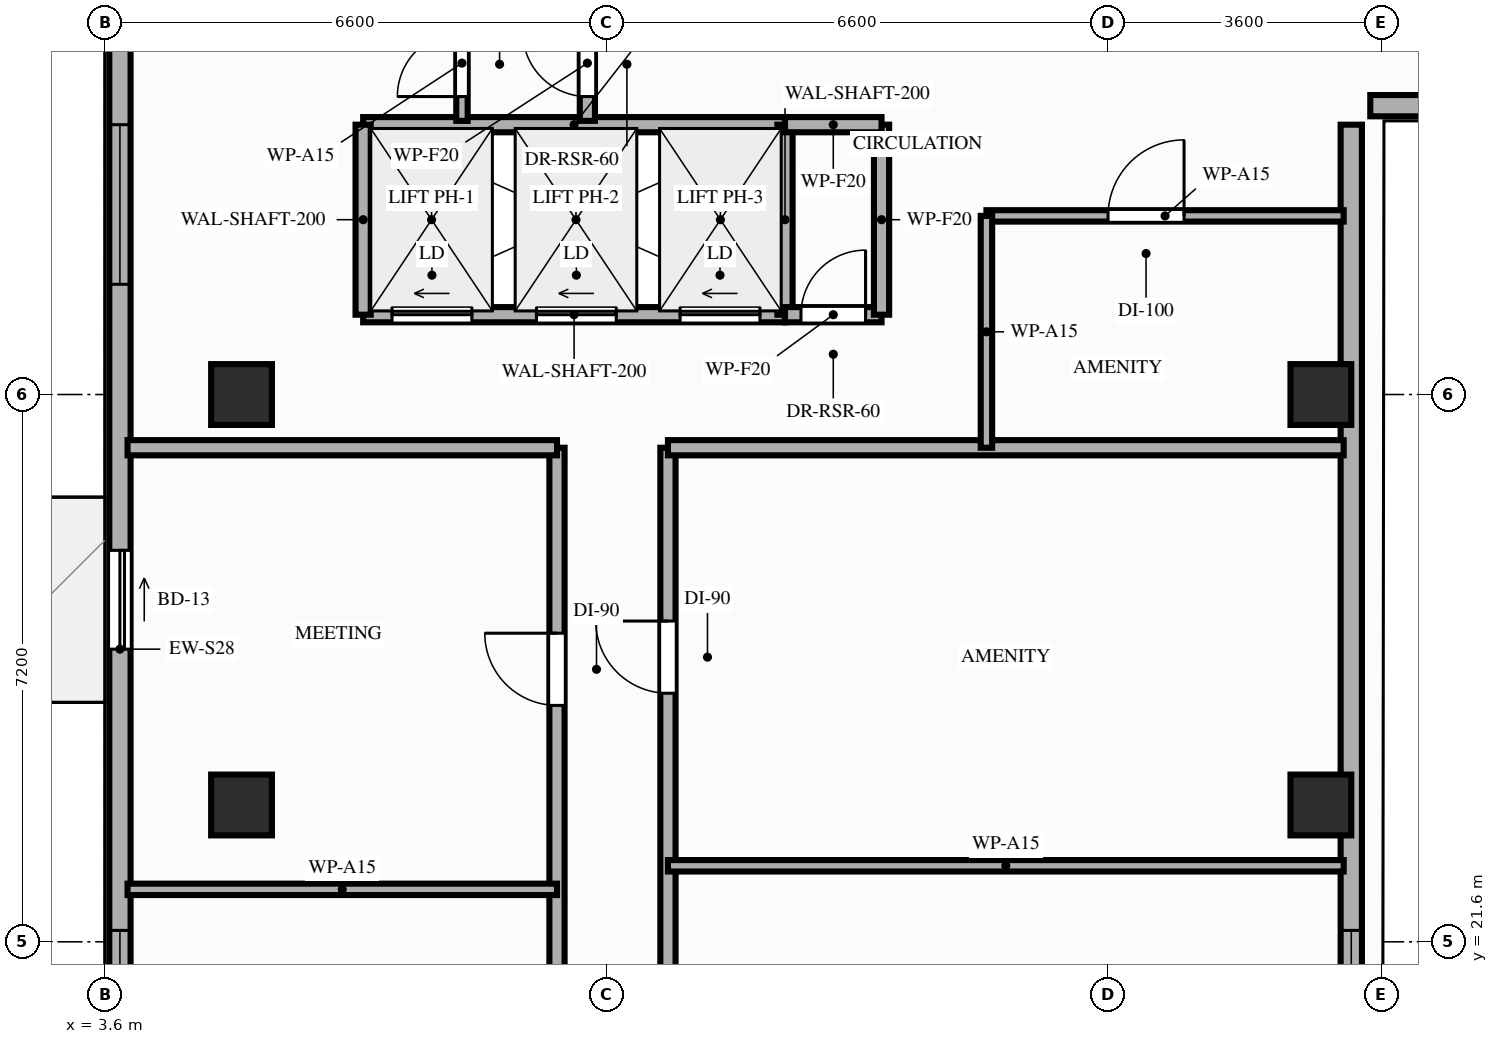
"""IFC4 building model, lengths in metres.
Left out: names, types, materials, properties, quantities, classifications, styles, units other than length and angle.
Written with IfcOpenShell. Run it as: python <this file> out.ifc"""

import sys

from ifc_helpers import new_model, si_unit, direction, frame, frame_2d, origin, origin_2d, place, context, subcontext, project, spatial, rectangle, extrude, element, fill, save


model = new_model("IFC4")
c1 = context("Model", 3, precision=1e-05, world=origin(), true_north=direction((0.0, 1.0)))
c2 = subcontext(c1, "Body", "Model", "MODEL_VIEW")
j1 = project(units=[si_unit("LENGTHUNIT", "METRE"), si_unit("PLANEANGLEUNIT", "RADIAN")], contexts=[c1])
p1 = place(None, origin())
s1 = spatial("IfcSite", under=j1, at=p1, CompositionType="ELEMENT")
p2 = place(p1, origin())
s2 = spatial("IfcBuilding", under=s1, at=p2, CompositionType="ELEMENT")
p3 = place(p2, frame((0.0, 0.0, 221.6)))
s3 = spatial("IfcBuildingStorey", under=s2, at=p3, CompositionType="ELEMENT", Elevation=221.6)
for number, where, z_axis, x_axis in (
    (1, (5.4, 23.4, 0.0), (0.0, 0.0, 1.0), (1.0, 0.0, 0.0)),
    (2, (19.6, 23.4, 0.0), (0.0, 0.0, 1.0), (1.0, 0.0, 0.0)),
    (3, (5.4, 28.8, 0.0), (0.0, 0.0, 1.0), (1.0, 0.0, 0.0)),
    (4, (19.6, 28.8, 0.0), (0.0, 0.0, 1.0), (1.0, 0.0, 0.0)),
):
    element("IfcColumn", number, at=place(p3, frame(where, z_axis=z_axis, x_axis=x_axis)), inside=s3, PredefinedType="COLUMN", context=c2, shape_type="SweptSolid", body=[
        extrude(rectangle(XDim=0.8, YDim=0.8, at=origin_2d()), origin(), (0.0, 0.0, 1.0), 3.2),
    ])
p4 = place(p3, frame((3.8, 42.1, 0.0), z_axis=(0.0, 0.0, 1.0), x_axis=(0.0, -1.0, 0.0)))
e5 = element("IfcWall", 5, at=p4, inside=s3, PredefinedType="STANDARD", context=c2, shape_type="SweptSolid", body=[
    extrude(rectangle(XDim=33.3, YDim=0.28, at=frame_2d((16.65, 0.0))), origin(), (0.0, 0.0, 1.0), 2.71),
])
p5 = place(p4, frame((26.15, 0.0, 0.0)))
e6 = element("IfcOpeningElement", 6, at=p5, cuts=e5, PredefinedType="OPENING", context=c2, shape_type="SweptSolid", body=[
    extrude(rectangle(XDim=1.3, YDim=2.08, at=frame_2d((0.65, 1.04))), frame((0.0, 0.15, 0.0), z_axis=(0.0, -1.0, 0.0), x_axis=(1.0, 0.0, 0.0)), (0.0, 0.0, 1.0), 0.3),
])
p6 = place(p4, frame((15.35, 0.0, 0.0)))
e7 = element("IfcOpeningElement", 7, at=p6, cuts=e5, PredefinedType="OPENING", context=c2, shape_type="SweptSolid", body=[
    extrude(rectangle(XDim=1.3, YDim=2.08, at=frame_2d((0.65, 1.04))), frame((0.0, 0.15, 0.0), z_axis=(0.0, -1.0, 0.0), x_axis=(1.0, 0.0, 0.0)), (0.0, 0.0, 1.0), 0.3),
])
p7 = place(p4, frame((30.65, 0.0, 0.85)))
e8 = element("IfcOpeningElement", 8, at=p7, cuts=e5, PredefinedType="OPENING", context=c2, shape_type="SweptSolid", body=[
    extrude(rectangle(XDim=2.1, YDim=1.61, at=frame_2d((1.05, 0.805))), frame((0.0, 0.15, 0.0), z_axis=(0.0, -1.0, 0.0), x_axis=(1.0, 0.0, 0.0)), (0.0, 0.0, 1.0), 0.3),
])
p8 = place(p4, frame((20.35, 0.0, 0.85)))
e9 = element("IfcOpeningElement", 9, at=p8, cuts=e5, PredefinedType="OPENING", context=c2, shape_type="SweptSolid", body=[
    extrude(rectangle(XDim=2.1, YDim=1.61, at=frame_2d((1.05, 0.805))), frame((0.0, 0.15, 0.0), z_axis=(0.0, -1.0, 0.0), x_axis=(1.0, 0.0, 0.0)), (0.0, 0.0, 1.0), 0.3),
])
p9 = place(p4, frame((9.75, 0.0, 0.85)))
e10 = element("IfcOpeningElement", 10, at=p9, cuts=e5, PredefinedType="OPENING", context=c2, shape_type="SweptSolid", body=[
    extrude(rectangle(XDim=2.1, YDim=1.61, at=frame_2d((1.05, 0.805))), frame((0.0, 0.15, 0.0), z_axis=(0.0, -1.0, 0.0), x_axis=(1.0, 0.0, 0.0)), (0.0, 0.0, 1.0), 0.3),
])
p10 = place(p4, frame((3.65, 0.0, 0.85)))
e11 = element("IfcOpeningElement", 11, at=p10, cuts=e5, PredefinedType="OPENING", context=c2, shape_type="SweptSolid", body=[
    extrude(rectangle(XDim=2.1, YDim=1.61, at=frame_2d((1.05, 0.805))), frame((0.0, 0.15, 0.0), z_axis=(0.0, -1.0, 0.0), x_axis=(1.0, 0.0, 0.0)), (0.0, 0.0, 1.0), 0.3),
])
p11 = place(p3, frame((20.0, 8.8, 0.0), z_axis=(0.0, 0.0, 1.0), x_axis=(0.0, 1.0, 0.0)))
e12 = element("IfcWall", 12, at=p11, inside=s3, PredefinedType="STANDARD", context=c2, shape_type="SweptSolid", body=[
    extrude(rectangle(XDim=23.55, YDim=0.28, at=frame_2d((11.775, 0.0))), origin(), (0.0, 0.0, 1.0), 2.51),
])
p12 = place(p11, frame((1.84, 0.0, 0.85)))
e13 = element("IfcOpeningElement", 13, at=p12, cuts=e12, PredefinedType="OPENING", context=c2, shape_type="SweptSolid", body=[
    extrude(rectangle(XDim=1.1, YDim=1.41, at=frame_2d((0.55, 0.705))), frame((0.0, 0.15, 0.0), z_axis=(0.0, -1.0, 0.0), x_axis=(1.0, 0.0, 0.0)), (0.0, 0.0, 1.0), 0.3),
])
p13 = place(p11, frame((5.45, 0.0, 0.85)))
e14 = element("IfcOpeningElement", 14, at=p13, cuts=e12, PredefinedType="OPENING", context=c2, shape_type="SweptSolid", body=[
    extrude(rectangle(XDim=2.1, YDim=1.41, at=frame_2d((1.05, 0.705))), frame((0.0, 0.15, 0.0), z_axis=(0.0, -1.0, 0.0), x_axis=(1.0, 0.0, 0.0)), (0.0, 0.0, 1.0), 0.3),
])
p14 = place(p11, frame((10.85, 0.0, 0.85)))
e15 = element("IfcOpeningElement", 15, at=p14, cuts=e12, PredefinedType="OPENING", context=c2, shape_type="SweptSolid", body=[
    extrude(rectangle(XDim=2.1, YDim=1.41, at=frame_2d((1.05, 0.705))), frame((0.0, 0.15, 0.0), z_axis=(0.0, -1.0, 0.0), x_axis=(1.0, 0.0, 0.0)), (0.0, 0.0, 1.0), 0.3),
])
p15 = place(p3, frame((20.25, 32.6, 0.0), z_axis=(0.0, 0.0, 1.0), x_axis=(1.0, 0.0, 0.0)))
e16 = element("IfcWall", 16, at=p15, inside=s3, PredefinedType="STANDARD", context=c2, shape_type="SweptSolid", body=[
    extrude(rectangle(XDim=7.35, YDim=0.28, at=frame_2d((3.675, 0.0))), origin(), (0.0, 0.0, 1.0), 2.51),
])
p16 = place(p3, frame((7.0, 29.85, 0.0), z_axis=(0.0, 0.0, 1.0), x_axis=(1.0, 0.0, 0.0)))
e17 = element("IfcWall", 17, at=p16, inside=s3, PredefinedType="MOVABLE", context=c2, shape_type="SweptSolid", body=[
    extrude(rectangle(XDim=5.55, YDim=0.2, at=frame_2d((2.775, 0.0))), origin(), (0.0, 0.0, 1.0), 3.02),
])
p17 = place(p16, frame((0.38, 0.0, 0.0)))
e18 = element("IfcOpeningElement", 18, at=p17, cuts=e17, PredefinedType="OPENING", context=c2, shape_type="SweptSolid", body=[
    extrude(rectangle(XDim=1.05, YDim=2.15, at=frame_2d((0.525, 1.075))), frame((0.0, 0.11, 0.0), z_axis=(0.0, -1.0, 0.0), x_axis=(1.0, 0.0, 0.0)), (0.0, 0.0, 1.0), 0.22),
])
p18 = place(p16, frame((2.28, 0.0, 0.0)))
e19 = element("IfcOpeningElement", 19, at=p18, cuts=e17, PredefinedType="OPENING", context=c2, shape_type="SweptSolid", body=[
    extrude(rectangle(XDim=1.05, YDim=2.15, at=frame_2d((0.525, 1.075))), frame((0.0, 0.11, 0.0), z_axis=(0.0, -1.0, 0.0), x_axis=(1.0, 0.0, 0.0)), (0.0, 0.0, 1.0), 0.22),
])
p19 = place(p16, frame((4.17, 0.0, 0.0)))
e20 = element("IfcOpeningElement", 20, at=p19, cuts=e17, PredefinedType="OPENING", context=c2, shape_type="SweptSolid", body=[
    extrude(rectangle(XDim=1.05, YDim=2.15, at=frame_2d((0.525, 1.075))), frame((0.0, 0.11, 0.0), z_axis=(0.0, -1.0, 0.0), x_axis=(1.0, 0.0, 0.0)), (0.0, 0.0, 1.0), 0.22),
])
p20 = place(p3, frame((7.0, 32.35, 0.0), z_axis=(0.0, 0.0, 1.0), x_axis=(1.0, 0.0, 0.0)))
e21 = element("IfcWall", 21, at=p20, inside=s3, PredefinedType="MOVABLE", context=c2, shape_type="SweptSolid", body=[
    extrude(rectangle(XDim=5.55, YDim=0.2, at=frame_2d((2.775, 0.0))), origin(), (0.0, 0.0, 1.0), 3.02),
])
for number, where, z_axis, x_axis in (
    (22, (7.0, 29.85, 0.0), (0.0, 0.0, 1.0), (0.0, 1.0, 0.0)),
    (23, (12.55, 29.85, 0.0), (0.0, 0.0, 1.0), (0.0, 1.0, 0.0)),
):
    element("IfcWall", number, at=place(p3, frame(where, z_axis=z_axis, x_axis=x_axis)), inside=s3, PredefinedType="MOVABLE", context=c2, shape_type="SweptSolid", body=[
        extrude(rectangle(XDim=2.5, YDim=0.2, at=frame_2d((1.25, 0.0))), origin(), (0.0, 0.0, 1.0), 3.02),
    ])
p21 = place(p3, frame((9.95, 32.4, 0.0), z_axis=(0.0, 0.0, 1.0), x_axis=(0.0, 1.0, 0.0)))
e24 = element("IfcWall", 24, at=p21, inside=s3, PredefinedType="PARTITIONING", context=c2, shape_type="SweptSolid", body=[
    extrude(rectangle(XDim=1.52, YDim=0.2, at=frame_2d((0.76, 0.0))), origin(), (0.0, 0.0, 1.0), 2.51),
])
p22 = place(p21, frame((0.32, 0.0, 0.0)))
e25 = element("IfcOpeningElement", 25, at=p22, cuts=e24, PredefinedType="OPENING", context=c2, shape_type="SweptSolid", body=[
    extrude(rectangle(XDim=0.85, YDim=2.05, at=frame_2d((0.425, 1.025))), frame((0.0, 0.11, 0.0), z_axis=(0.0, -1.0, 0.0), x_axis=(1.0, 0.0, 0.0)), (0.0, 0.0, 1.0), 0.22),
])
p23 = place(p3, frame((8.3, 32.4, 0.0), z_axis=(0.0, 0.0, 1.0), x_axis=(0.0, 1.0, 0.0)))
e26 = element("IfcWall", 26, at=p23, inside=s3, PredefinedType="PARTITIONING", context=c2, shape_type="SweptSolid", body=[
    extrude(rectangle(XDim=1.52, YDim=0.15, at=frame_2d((0.76, 0.0))), origin(), (0.0, 0.0, 1.0), 2.51),
])
p24 = place(p23, frame((0.32, 0.0, 0.0)))
e27 = element("IfcOpeningElement", 27, at=p24, cuts=e26, PredefinedType="OPENING", context=c2, shape_type="SweptSolid", body=[
    extrude(rectangle(XDim=0.85, YDim=2.05, at=frame_2d((0.425, 1.025))), frame((0.0, 0.085, 0.0), z_axis=(0.0, -1.0, 0.0), x_axis=(1.0, 0.0, 0.0)), (0.0, 0.0, 1.0), 0.17),
])
p25 = place(p3, frame((12.55, 29.85, 0.0), z_axis=(0.0, 0.0, 1.0), x_axis=(1.0, 0.0, 0.0)))
e28 = element("IfcWall", 28, at=p25, inside=s3, PredefinedType="PARTITIONING", context=c2, shape_type="SweptSolid", body=[
    extrude(rectangle(XDim=1.27, YDim=0.2, at=frame_2d((0.635, 0.0))), origin(), (0.0, 0.0, 1.0), 3.02),
])
p26 = place(p25, frame((0.21, 0.0, 0.0)))
e29 = element("IfcOpeningElement", 29, at=p26, cuts=e28, PredefinedType="OPENING", context=c2, shape_type="SweptSolid", body=[
    extrude(rectangle(XDim=0.85, YDim=2.05, at=frame_2d((0.425, 1.025))), frame((0.0, 0.11, 0.0), z_axis=(0.0, -1.0, 0.0), x_axis=(1.0, 0.0, 0.0)), (0.0, 0.0, 1.0), 0.22),
])
p27 = place(p3, frame((13.82, 29.85, 0.0), z_axis=(0.0, 0.0, 1.0), x_axis=(0.0, 1.0, 0.0)))
e30 = element("IfcWall", 30, at=p27, inside=s3, PredefinedType="PARTITIONING", context=c2, shape_type="SweptSolid", body=[
    extrude(rectangle(XDim=2.5, YDim=0.2, at=frame_2d((1.25, 0.0))), origin(), (0.0, 0.0, 1.0), 3.02),
])
p28 = place(p3, frame((12.55, 32.35, 0.0), z_axis=(0.0, 0.0, 1.0), x_axis=(1.0, 0.0, 0.0)))
e31 = element("IfcWall", 31, at=p28, inside=s3, PredefinedType="PARTITIONING", context=c2, shape_type="SweptSolid", body=[
    extrude(rectangle(XDim=1.27, YDim=0.2, at=frame_2d((0.635, 0.0))), origin(), (0.0, 0.0, 1.0), 3.02),
])
p29 = place(p3, frame((9.55, 12.4, 0.0), z_axis=(0.0, 0.0, 1.0), x_axis=(0.0, 1.0, 0.0)))
e32 = element("IfcWall", 32, at=p29, inside=s3, PredefinedType="PARTITIONING", context=c2, shape_type="SweptSolid", body=[
    extrude(rectangle(XDim=15.7, YDim=0.2, at=frame_2d((7.85, 0.0))), origin(), (0.0, 0.0, 1.0), 2.51),
])
p30 = place(p29, frame((4.46, 0.0, 0.0)))
e33 = element("IfcOpeningElement", 33, at=p30, cuts=e32, PredefinedType="OPENING", context=c2, shape_type="SweptSolid", body=[
    extrude(rectangle(XDim=0.95, YDim=2.15, at=frame_2d((0.475, 1.075))), frame((0.0, 0.11, 0.0), z_axis=(0.0, -1.0, 0.0), x_axis=(1.0, 0.0, 0.0)), (0.0, 0.0, 1.0), 0.22),
])
p31 = place(p29, frame((12.31, 0.0, 0.0)))
e34 = element("IfcOpeningElement", 34, at=p31, cuts=e32, PredefinedType="OPENING", context=c2, shape_type="SweptSolid", body=[
    extrude(rectangle(XDim=0.95, YDim=2.15, at=frame_2d((0.475, 1.075))), frame((0.0, 0.11, 0.0), z_axis=(0.0, -1.0, 0.0), x_axis=(1.0, 0.0, 0.0)), (0.0, 0.0, 1.0), 0.22),
])
p32 = place(p3, frame((11.01, 12.4, 0.0), z_axis=(0.0, 0.0, 1.0), x_axis=(0.0, 1.0, 0.0)))
e35 = element("IfcWall", 35, at=p32, inside=s3, PredefinedType="PARTITIONING", context=c2, shape_type="SweptSolid", body=[
    extrude(rectangle(XDim=15.7, YDim=0.2, at=frame_2d((7.85, 0.0))), origin(), (0.0, 0.0, 1.0), 2.51),
])
p33 = place(p32, frame((0.33, 0.0, 0.0)))
e36 = element("IfcOpeningElement", 36, at=p33, cuts=e35, PredefinedType="OPENING", context=c2, shape_type="SweptSolid", body=[
    extrude(rectangle(XDim=0.95, YDim=2.1, at=frame_2d((0.475, 1.05))), frame((0.0, 0.11, 0.0), z_axis=(0.0, -1.0, 0.0), x_axis=(1.0, 0.0, 0.0)), (0.0, 0.0, 1.0), 0.22),
])
p34 = place(p32, frame((3.02, 0.0, 0.0)))
e37 = element("IfcOpeningElement", 37, at=p34, cuts=e35, PredefinedType="OPENING", context=c2, shape_type="SweptSolid", body=[
    extrude(rectangle(XDim=0.95, YDim=2.15, at=frame_2d((0.475, 1.075))), frame((0.0, 0.11, 0.0), z_axis=(0.0, -1.0, 0.0), x_axis=(1.0, 0.0, 0.0)), (0.0, 0.0, 1.0), 0.22),
])
p35 = place(p32, frame((7.32, 0.0, 0.0)))
e38 = element("IfcOpeningElement", 38, at=p35, cuts=e35, PredefinedType="OPENING", context=c2, shape_type="SweptSolid", body=[
    extrude(rectangle(XDim=0.95, YDim=2.15, at=frame_2d((0.475, 1.075))), frame((0.0, 0.11, 0.0), z_axis=(0.0, -1.0, 0.0), x_axis=(1.0, 0.0, 0.0)), (0.0, 0.0, 1.0), 0.22),
])
p36 = place(p32, frame((12.47, 0.0, 0.0)))
e39 = element("IfcOpeningElement", 39, at=p36, cuts=e35, PredefinedType="OPENING", context=c2, shape_type="SweptSolid", body=[
    extrude(rectangle(XDim=0.95, YDim=2.15, at=frame_2d((0.475, 1.075))), frame((0.0, 0.11, 0.0), z_axis=(0.0, -1.0, 0.0), x_axis=(1.0, 0.0, 0.0)), (0.0, 0.0, 1.0), 0.22),
])
p37 = place(p3, frame((3.9, 28.1, 0.0), z_axis=(0.0, 0.0, 1.0), x_axis=(1.0, 0.0, 0.0)))
e40 = element("IfcWall", 40, at=p37, inside=s3, PredefinedType="PARTITIONING", context=c2, shape_type="SweptSolid", body=[
    extrude(rectangle(XDim=5.65, YDim=0.2, at=frame_2d((2.825, 0.0))), origin(), (0.0, 0.0, 1.0), 2.51),
])
p38 = place(p3, frame((11.01, 28.1, 0.0), z_axis=(0.0, 0.0, 1.0), x_axis=(1.0, 0.0, 0.0)))
e41 = element("IfcWall", 41, at=p38, inside=s3, PredefinedType="PARTITIONING", context=c2, shape_type="SweptSolid", body=[
    extrude(rectangle(XDim=8.89, YDim=0.2, at=frame_2d((4.445, 0.0))), origin(), (0.0, 0.0, 1.0), 2.51),
])
p39 = place(p3, frame((15.2, 31.15, 0.0), z_axis=(0.0, 0.0, 1.0), x_axis=(1.0, 0.0, 0.0)))
e42 = element("IfcWall", 42, at=p39, inside=s3, PredefinedType="PARTITIONING", context=c2, shape_type="SweptSolid", body=[
    extrude(rectangle(XDim=4.7, YDim=0.15, at=frame_2d((2.35, 0.0))), origin(), (0.0, 0.0, 1.0), 2.51),
])
p40 = place(p39, frame((1.6, 0.0, 0.0)))
e43 = element("IfcOpeningElement", 43, at=p40, cuts=e42, PredefinedType="OPENING", context=c2, shape_type="SweptSolid", body=[
    extrude(rectangle(XDim=1.0, YDim=2.15, at=frame_2d((0.5, 1.075))), frame((0.0, 0.085, 0.0), z_axis=(0.0, -1.0, 0.0), x_axis=(1.0, 0.0, 0.0)), (0.0, 0.0, 1.0), 0.17),
])
p41 = place(p3, frame((15.2, 28.1, 0.0), z_axis=(0.0, 0.0, 1.0), x_axis=(0.0, 1.0, 0.0)))
e44 = element("IfcWall", 44, at=p41, inside=s3, PredefinedType="PARTITIONING", context=c2, shape_type="SweptSolid", body=[
    extrude(rectangle(XDim=3.05, YDim=0.15, at=frame_2d((1.525, 0.0))), origin(), (0.0, 0.0, 1.0), 2.51),
])
p42 = place(p3, frame((3.9, 22.29, 0.0), z_axis=(0.0, 0.0, 1.0), x_axis=(1.0, 0.0, 0.0)))
e45 = element("IfcWall", 45, at=p42, inside=s3, PredefinedType="PARTITIONING", context=c2, shape_type="SweptSolid", body=[
    extrude(rectangle(XDim=5.65, YDim=0.15, at=frame_2d((2.825, 0.0))), origin(), (0.0, 0.0, 1.0), 2.51),
])
p43 = place(p3, frame((11.01, 22.6, 0.0), z_axis=(0.0, 0.0, 1.0), x_axis=(1.0, 0.0, 0.0)))
e46 = element("IfcWall", 46, at=p43, inside=s3, PredefinedType="PARTITIONING", context=c2, shape_type="SweptSolid", body=[
    extrude(rectangle(XDim=8.89, YDim=0.15, at=frame_2d((4.445, 0.0))), origin(), (0.0, 0.0, 1.0), 2.51),
])
p44 = place(p6, origin())
e47 = element("IfcDoor", 47, at=p44, inside=s3, OperationType="SLIDING_TO_LEFT", PredefinedType="DOOR", context=c2, shape_type="SweptSolid", body=[
    extrude(rectangle(XDim=1.3, YDim=2.08, at=frame_2d((0.65, 1.04))), frame((0.0, 0.025, 0.0), z_axis=(0.0, -1.0, 0.0), x_axis=(1.0, 0.0, 0.0)), (0.0, 0.0, 1.0), 0.05),
])
fill(e7, e47)
p45 = place(p8, origin())
e48 = element("IfcWindow", 48, at=p45, inside=s3, PartitioningType="SINGLE_PANEL", PredefinedType="WINDOW", context=c2, shape_type="SweptSolid", body=[
    extrude(rectangle(XDim=2.1, YDim=1.61, at=frame_2d((1.05, 0.805))), frame((0.0, 0.03, 0.0), z_axis=(0.0, -1.0, 0.0), x_axis=(1.0, 0.0, 0.0)), (0.0, 0.0, 1.0), 0.06),
])
fill(e9, e48)
p46 = place(p9, origin())
e49 = element("IfcWindow", 49, at=p46, inside=s3, PartitioningType="SINGLE_PANEL", PredefinedType="WINDOW", context=c2, shape_type="SweptSolid", body=[
    extrude(rectangle(XDim=2.1, YDim=1.61, at=frame_2d((1.05, 0.805))), frame((0.0, 0.03, 0.0), z_axis=(0.0, -1.0, 0.0), x_axis=(1.0, 0.0, 0.0)), (0.0, 0.0, 1.0), 0.06),
])
fill(e10, e49)
p47 = place(p14, origin())
e50 = element("IfcWindow", 50, at=p47, inside=s3, PartitioningType="SINGLE_PANEL", PredefinedType="WINDOW", context=c2, shape_type="SweptSolid", body=[
    extrude(rectangle(XDim=2.1, YDim=1.41, at=frame_2d((1.05, 0.705))), frame((0.0, 0.03, 0.0), z_axis=(0.0, -1.0, 0.0), x_axis=(1.0, 0.0, 0.0)), (0.0, 0.0, 1.0), 0.06),
])
fill(e15, e50)
p48 = place(p17, origin())
e51 = element("IfcDoor", 51, at=p48, inside=s3, OperationType="SLIDING_TO_LEFT", PredefinedType="DOOR", context=c2, shape_type="SweptSolid", body=[
    extrude(rectangle(XDim=1.05, YDim=2.15, at=frame_2d((0.525, 1.075))), frame((0.0, 0.025, 0.0), z_axis=(0.0, -1.0, 0.0), x_axis=(1.0, 0.0, 0.0)), (0.0, 0.0, 1.0), 0.05),
])
fill(e18, e51)
p49 = place(p18, origin())
e52 = element("IfcDoor", 52, at=p49, inside=s3, OperationType="SLIDING_TO_LEFT", PredefinedType="DOOR", context=c2, shape_type="SweptSolid", body=[
    extrude(rectangle(XDim=1.05, YDim=2.15, at=frame_2d((0.525, 1.075))), frame((0.0, 0.025, 0.0), z_axis=(0.0, -1.0, 0.0), x_axis=(1.0, 0.0, 0.0)), (0.0, 0.0, 1.0), 0.05),
])
fill(e19, e52)
p50 = place(p19, origin())
e53 = element("IfcDoor", 53, at=p50, inside=s3, OperationType="SLIDING_TO_LEFT", PredefinedType="DOOR", context=c2, shape_type="SweptSolid", body=[
    extrude(rectangle(XDim=1.05, YDim=2.15, at=frame_2d((0.525, 1.075))), frame((0.0, 0.025, 0.0), z_axis=(0.0, -1.0, 0.0), x_axis=(1.0, 0.0, 0.0)), (0.0, 0.0, 1.0), 0.05),
])
fill(e20, e53)
p51 = place(p22, origin())
e54 = element("IfcDoor", 54, at=p51, inside=s3, OperationType="SINGLE_SWING_RIGHT", PredefinedType="DOOR", context=c2, shape_type="SweptSolid", body=[
    extrude(rectangle(XDim=0.85, YDim=2.05, at=frame_2d((0.425, 1.025))), frame((0.0, 0.025, 0.0), z_axis=(0.0, -1.0, 0.0), x_axis=(1.0, 0.0, 0.0)), (0.0, 0.0, 1.0), 0.05),
])
fill(e25, e54)
p52 = place(p24, origin())
e55 = element("IfcDoor", 55, at=p52, inside=s3, OperationType="SINGLE_SWING_LEFT", PredefinedType="DOOR", context=c2, shape_type="SweptSolid", body=[
    extrude(rectangle(XDim=0.85, YDim=2.05, at=frame_2d((0.425, 1.025))), frame((0.0, 0.025, 0.0), z_axis=(0.0, -1.0, 0.0), x_axis=(1.0, 0.0, 0.0)), (0.0, 0.0, 1.0), 0.05),
])
fill(e27, e55)
p53 = place(p26, origin())
e56 = element("IfcDoor", 56, at=p53, inside=s3, OperationType="SINGLE_SWING_RIGHT", PredefinedType="DOOR", context=c2, shape_type="SweptSolid", body=[
    extrude(rectangle(XDim=0.85, YDim=2.05, at=frame_2d((0.425, 1.025))), frame((0.0, 0.025, 0.0), z_axis=(0.0, -1.0, 0.0), x_axis=(1.0, 0.0, 0.0)), (0.0, 0.0, 1.0), 0.05),
])
fill(e29, e56)
p54 = place(p40, origin())
e57 = element("IfcDoor", 57, at=p54, inside=s3, OperationType="SINGLE_SWING_RIGHT", PredefinedType="DOOR", context=c2, shape_type="SweptSolid", body=[
    extrude(rectangle(XDim=1.0, YDim=2.15, at=frame_2d((0.5, 1.075))), frame((0.0, 0.025, 0.0), z_axis=(0.0, -1.0, 0.0), x_axis=(1.0, 0.0, 0.0)), (0.0, 0.0, 1.0), 0.05),
])
fill(e43, e57)
p55 = place(p31, origin())
e58 = element("IfcDoor", 58, at=p55, inside=s3, OperationType="SINGLE_SWING_RIGHT", PredefinedType="DOOR", context=c2, shape_type="SweptSolid", body=[
    extrude(rectangle(XDim=0.95, YDim=2.15, at=frame_2d((0.475, 1.075))), frame((0.0, 0.025, 0.0), z_axis=(0.0, -1.0, 0.0), x_axis=(1.0, 0.0, 0.0)), (0.0, 0.0, 1.0), 0.05),
])
fill(e34, e58)
p56 = place(p36, origin())
e59 = element("IfcDoor", 59, at=p56, inside=s3, OperationType="SINGLE_SWING_RIGHT", PredefinedType="DOOR", context=c2, shape_type="SweptSolid", body=[
    extrude(rectangle(XDim=0.95, YDim=2.15, at=frame_2d((0.475, 1.075))), frame((0.0, 0.025, 0.0), z_axis=(0.0, -1.0, 0.0), x_axis=(1.0, 0.0, 0.0)), (0.0, 0.0, 1.0), 0.05),
])
fill(e39, e59)
save(model, sys.argv[1])
